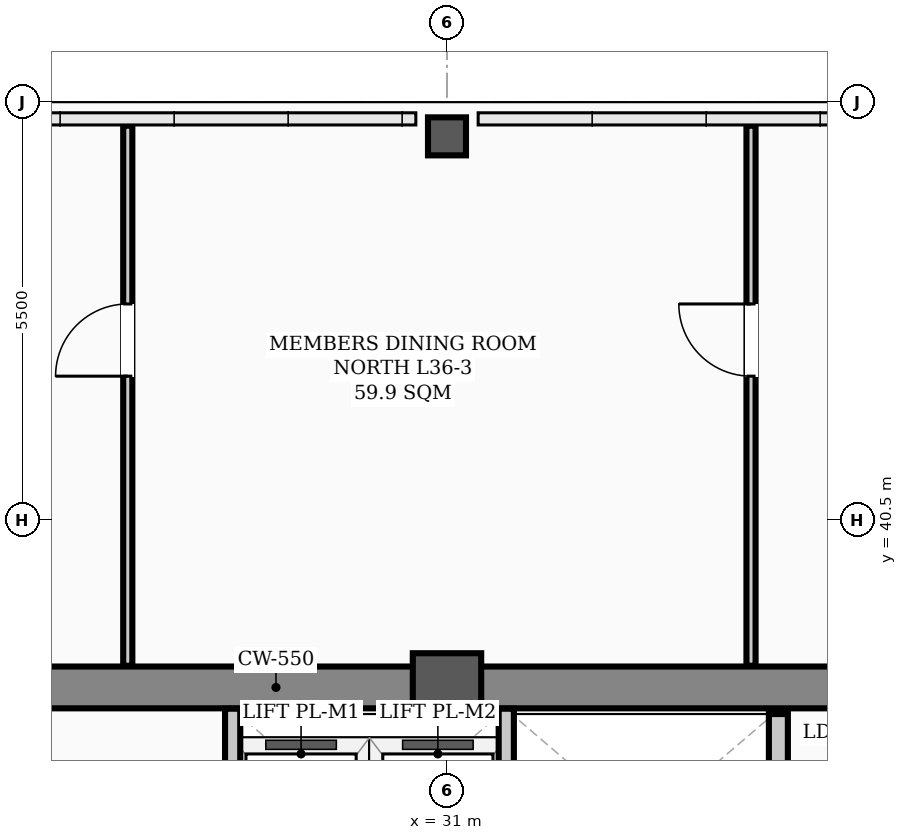
"""IFC4 building model, lengths in metres.
Left out: names, types, materials, properties, quantities, classifications, styles, units other than length and angle.
Written with IfcOpenShell. Run it as: python <this file> out.ifc"""

import sys

from ifc_helpers import new_model, si_unit, direction, frame, frame_2d, origin, origin_2d, place, context, subcontext, project, spatial, rectangle, hollow_rectangle, extrude, element, fill, save


model = new_model("IFC4")
c1 = context("Model", 3, precision=1e-05, world=origin(), true_north=direction((0.0, 1.0)))
c2 = subcontext(c1, "Body", "Model", "MODEL_VIEW")
j1 = project(units=[si_unit("LENGTHUNIT", "METRE"), si_unit("PLANEANGLEUNIT", "RADIAN")], contexts=[c1])
p1 = place(None, origin())
s1 = spatial("IfcSite", under=j1, at=p1, CompositionType="ELEMENT")
p2 = place(p1, origin())
s2 = spatial("IfcBuilding", under=s1, at=p2, CompositionType="ELEMENT")
p3 = place(p2, frame((0.0, 0.0, 146.1)))
s3 = spatial("IfcBuildingStorey", under=s2, at=p3, CompositionType="ELEMENT", Elevation=146.1)
p4 = place(p3, frame((31.0, 38.3, 0.0), z_axis=(0.0, 0.0, 1.0), x_axis=(1.0, 0.0, 0.0)))
e1 = element("IfcColumn", 1, at=p4, inside=s3, PredefinedType="COLUMN", context=c2, shape_type="SweptSolid", body=[
    extrude(hollow_rectangle(XDim=0.9, YDim=0.9, WallThickness=0.035, InnerFilletRadius=0.017, OuterFilletRadius=0.052, at=origin_2d()), origin(), (0.0, 0.0, 1.0), 3.9),
])
p5 = place(p3, frame((31.0, 45.55, 0.0), z_axis=(0.0, 0.0, 1.0), x_axis=(1.0, 0.0, 0.0)))
e2 = element("IfcColumn", 2, at=p5, inside=s3, PredefinedType="COLUMN", context=c2, shape_type="SweptSolid", body=[
    extrude(hollow_rectangle(XDim=0.5, YDim=0.5, WallThickness=0.024, InnerFilletRadius=0.012, OuterFilletRadius=0.036, at=origin_2d()), origin(), (0.0, 0.0, 1.0), 3.9),
])
p6 = place(p3, frame((13.5, 38.3, 0.0), z_axis=(0.0, 0.0, 1.0), x_axis=(1.0, 0.0, 0.0)))
e3 = element("IfcWall", 3, at=p6, inside=s3, PredefinedType="SHEAR", context=c2, shape_type="SweptSolid", body=[
    extrude(rectangle(XDim=30.5, YDim=0.55, at=frame_2d((15.25, 0.0))), origin(), (0.0, 0.0, 1.0), 3.72),
])
p7 = place(p3, frame((35.36, 34.9, 0.0), z_axis=(0.0, 0.0, 1.0), x_axis=(0.0, 1.0, 0.0)))
e4 = element("IfcWall", 4, at=p7, inside=s3, PredefinedType="STANDARD", context=c2, shape_type="SweptSolid", body=[
    extrude(rectangle(XDim=3.05, YDim=0.25, at=frame_2d((1.525, 0.0))), origin(), (0.0, 0.0, 1.0), 3.35),
])
p8 = place(p3, frame((26.8, 38.585, 0.0), z_axis=(0.0, 0.0, 1.0), x_axis=(0.0, 1.0, 0.0)))
e5 = element("IfcWall", 5, at=p8, inside=s3, PredefinedType="PARTITIONING", context=c2, shape_type="SweptSolid", body=[
    extrude(rectangle(XDim=7.105, YDim=0.12, at=frame_2d((3.552, 0.0))), origin(), (0.0, 0.0, 1.0), 3.212),
])
p9 = place(p8, frame((3.81, 0.0, 0.0)))
e6 = element("IfcOpeningElement", 6, at=p9, cuts=e5, PredefinedType="OPENING", context=c2, shape_type="SweptSolid", body=[
    extrude(rectangle(XDim=0.95, YDim=2.08, at=frame_2d((0.475, 1.04))), frame((0.0, 0.07, 0.0), z_axis=(0.0, -1.0, 0.0), x_axis=(1.0, 0.0, 0.0)), (0.0, 0.0, 1.0), 0.14),
])
p10 = place(p3, frame((35.0, 38.585, 0.0), z_axis=(0.0, 0.0, 1.0), x_axis=(0.0, 1.0, 0.0)))
e7 = element("IfcWall", 7, at=p10, inside=s3, PredefinedType="PARTITIONING", context=c2, shape_type="SweptSolid", body=[
    extrude(rectangle(XDim=7.105, YDim=0.12, at=frame_2d((3.552, 0.0))), origin(), (0.0, 0.0, 1.0), 3.212),
])
p11 = place(p10, frame((3.81, 0.0, 0.0)))
e8 = element("IfcOpeningElement", 8, at=p11, cuts=e7, PredefinedType="OPENING", context=c2, shape_type="SweptSolid", body=[
    extrude(rectangle(XDim=0.95, YDim=2.08, at=frame_2d((0.475, 1.04))), frame((0.0, 0.07, 0.0), z_axis=(0.0, -1.0, 0.0), x_axis=(1.0, 0.0, 0.0)), (0.0, 0.0, 1.0), 0.14),
])
for number, where, z_axis, x_axis in (
    (9, (28.18, 34.9, 0.0), (0.0, 0.0, 1.0), (0.0, 1.0, 0.0)),
    (10, (31.78, 34.9, 0.0), (0.0, 0.0, 1.0), (0.0, 1.0, 0.0)),
):
    element("IfcWall", number, at=place(p3, frame(where, z_axis=z_axis, x_axis=x_axis)), inside=s3, PredefinedType="STANDARD", context=c2, shape_type="SweptSolid", body=[
        extrude(rectangle(XDim=3.12, YDim=0.2, at=frame_2d((1.56, 0.0))), origin(), (0.0, 0.0, 1.0), 3.35),
    ])
p12 = place(p9, origin())
e11 = element("IfcDoor", 11, at=p12, inside=s3, OperationType="SINGLE_SWING_LEFT", PredefinedType="DOOR", context=c2, shape_type="SweptSolid", body=[
    extrude(rectangle(XDim=0.95, YDim=2.08, at=frame_2d((0.475, 1.04))), frame((0.0, 0.025, 0.0), z_axis=(0.0, -1.0, 0.0), x_axis=(1.0, 0.0, 0.0)), (0.0, 0.0, 1.0), 0.05),
])
fill(e6, e11)
p13 = place(p11, origin())
e12 = element("IfcDoor", 12, at=p13, inside=s3, OperationType="SINGLE_SWING_RIGHT", PredefinedType="DOOR", context=c2, shape_type="SweptSolid", body=[
    extrude(rectangle(XDim=0.95, YDim=2.08, at=frame_2d((0.475, 1.04))), frame((0.0, 0.025, 0.0), z_axis=(0.0, -1.0, 0.0), x_axis=(1.0, 0.0, 0.0)), (0.0, 0.0, 1.0), 0.05),
])
fill(e8, e12)
save(model, sys.argv[1])
